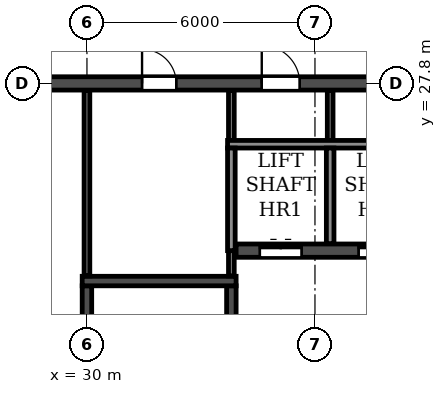
"""IFC4 building model, lengths in metres.
Left out: names, types, materials, properties, quantities, classifications, styles, units other than length and angle.
Written with IfcOpenShell. Run it as: python <this file> out.ifc"""

import sys

from ifc_helpers import new_model, si_unit, direction, frame, frame_2d, origin, place, context, subcontext, project, spatial, rectangle, extrude, element, fill, save


model = new_model("IFC4")
c1 = context("Model", 3, precision=1e-05, world=origin(), true_north=direction((0.0, 1.0)))
c2 = subcontext(c1, "Body", "Model", "MODEL_VIEW")
j1 = project(units=[si_unit("LENGTHUNIT", "METRE"), si_unit("PLANEANGLEUNIT", "RADIAN")], contexts=[c1])
p1 = place(None, origin())
s1 = spatial("IfcSite", under=j1, at=p1, CompositionType="ELEMENT")
p2 = place(p1, origin())
s2 = spatial("IfcBuilding", under=s1, at=p2, CompositionType="ELEMENT")
p3 = place(p2, frame((0.0, 0.0, 231.3)))
s3 = spatial("IfcBuildingStorey", under=s2, at=p3, CompositionType="ELEMENT", Elevation=231.3)
p4 = place(p3, frame((18.2, 27.8, 0.0), z_axis=(0.0, 0.0, 1.0), x_axis=(1.0, 0.0, 0.0)))
e1 = element("IfcWall", 1, at=p4, inside=s3, PredefinedType="SOLIDWALL", context=c2, shape_type="SweptSolid", body=[
    extrude(rectangle(XDim=65.6, YDim=0.35, at=frame_2d((32.8, 0.0))), origin(), (0.0, 0.0, 1.0), 3.08),
])
p5 = place(p4, frame((0.7, 0.0, 0.0)))
e2 = element("IfcOpeningElement", 2, at=p5, cuts=e1, PredefinedType="OPENING", context=c2, shape_type="SweptSolid", body=[
    extrude(rectangle(XDim=1.0, YDim=2.1, at=frame_2d((0.5, 1.05))), frame((0.0, 0.185, 0.0), z_axis=(0.0, -1.0, 0.0), x_axis=(1.0, 0.0, 0.0)), (0.0, 0.0, 1.0), 0.37),
])
p6 = place(p4, frame((4.05, 0.0, 0.0)))
e3 = element("IfcOpeningElement", 3, at=p6, cuts=e1, PredefinedType="OPENING", context=c2, shape_type="SweptSolid", body=[
    extrude(rectangle(XDim=0.9, YDim=2.1, at=frame_2d((0.45, 1.05))), frame((0.0, 0.185, 0.0), z_axis=(0.0, -1.0, 0.0), x_axis=(1.0, 0.0, 0.0)), (0.0, 0.0, 1.0), 0.37),
])
p7 = place(p4, frame((13.25, 0.0, 0.0)))
e4 = element("IfcOpeningElement", 4, at=p7, cuts=e1, PredefinedType="OPENING", context=c2, shape_type="SweptSolid", body=[
    extrude(rectangle(XDim=0.9, YDim=2.1, at=frame_2d((0.45, 1.05))), frame((0.0, 0.185, 0.0), z_axis=(0.0, -1.0, 0.0), x_axis=(1.0, 0.0, 0.0)), (0.0, 0.0, 1.0), 0.37),
])
p8 = place(p4, frame((16.4, 0.0, 0.0)))
e5 = element("IfcOpeningElement", 5, at=p8, cuts=e1, PredefinedType="OPENING", context=c2, shape_type="SweptSolid", body=[
    extrude(rectangle(XDim=1.0, YDim=2.1, at=frame_2d((0.5, 1.05))), frame((0.0, 0.185, 0.0), z_axis=(0.0, -1.0, 0.0), x_axis=(1.0, 0.0, 0.0)), (0.0, 0.0, 1.0), 0.37),
])
p9 = place(p4, frame((21.6, 0.0, 0.0)))
e6 = element("IfcOpeningElement", 6, at=p9, cuts=e1, PredefinedType="OPENING", context=c2, shape_type="SweptSolid", body=[
    extrude(rectangle(XDim=1.0, YDim=2.1, at=frame_2d((0.5, 1.05))), frame((0.0, 0.185, 0.0), z_axis=(0.0, -1.0, 0.0), x_axis=(1.0, 0.0, 0.0)), (0.0, 0.0, 1.0), 0.37),
])
p10 = place(p4, frame((29.4, 0.0, 0.0)))
e7 = element("IfcOpeningElement", 7, at=p10, cuts=e1, PredefinedType="OPENING", context=c2, shape_type="SweptSolid", body=[
    extrude(rectangle(XDim=1.0, YDim=2.1, at=frame_2d((0.5, 1.05))), frame((0.0, 0.185, 0.0), z_axis=(0.0, -1.0, 0.0), x_axis=(1.0, 0.0, 0.0)), (0.0, 0.0, 1.0), 0.37),
])
p11 = place(p4, frame((32.3, 0.0, 0.0)))
e8 = element("IfcOpeningElement", 8, at=p11, cuts=e1, PredefinedType="OPENING", context=c2, shape_type="SweptSolid", body=[
    extrude(rectangle(XDim=1.0, YDim=2.1, at=frame_2d((0.5, 1.05))), frame((0.0, 0.185, 0.0), z_axis=(0.0, -1.0, 0.0), x_axis=(1.0, 0.0, 0.0)), (0.0, 0.0, 1.0), 0.37),
])
p12 = place(p4, frame((35.2, 0.0, 0.0)))
e9 = element("IfcOpeningElement", 9, at=p12, cuts=e1, PredefinedType="OPENING", context=c2, shape_type="SweptSolid", body=[
    extrude(rectangle(XDim=1.0, YDim=2.1, at=frame_2d((0.5, 1.05))), frame((0.0, 0.185, 0.0), z_axis=(0.0, -1.0, 0.0), x_axis=(1.0, 0.0, 0.0)), (0.0, 0.0, 1.0), 0.37),
])
p13 = place(p4, frame((37.8, 0.0, 0.0)))
e10 = element("IfcOpeningElement", 10, at=p13, cuts=e1, PredefinedType="OPENING", context=c2, shape_type="SweptSolid", body=[
    extrude(rectangle(XDim=1.0, YDim=2.1, at=frame_2d((0.5, 1.05))), frame((0.0, 0.185, 0.0), z_axis=(0.0, -1.0, 0.0), x_axis=(1.0, 0.0, 0.0)), (0.0, 0.0, 1.0), 0.37),
])
p14 = place(p4, frame((40.4, 0.0, 0.0)))
e11 = element("IfcOpeningElement", 11, at=p14, cuts=e1, PredefinedType="OPENING", context=c2, shape_type="SweptSolid", body=[
    extrude(rectangle(XDim=1.0, YDim=2.1, at=frame_2d((0.5, 1.05))), frame((0.0, 0.185, 0.0), z_axis=(0.0, -1.0, 0.0), x_axis=(1.0, 0.0, 0.0)), (0.0, 0.0, 1.0), 0.37),
])
p15 = place(p4, frame((43.0, 0.0, 0.0)))
e12 = element("IfcOpeningElement", 12, at=p15, cuts=e1, PredefinedType="OPENING", context=c2, shape_type="SweptSolid", body=[
    extrude(rectangle(XDim=1.0, YDim=2.1, at=frame_2d((0.5, 1.05))), frame((0.0, 0.185, 0.0), z_axis=(0.0, -1.0, 0.0), x_axis=(1.0, 0.0, 0.0)), (0.0, 0.0, 1.0), 0.37),
])
p16 = place(p4, frame((45.6, 0.0, 0.0)))
e13 = element("IfcOpeningElement", 13, at=p16, cuts=e1, PredefinedType="OPENING", context=c2, shape_type="SweptSolid", body=[
    extrude(rectangle(XDim=1.0, YDim=2.1, at=frame_2d((0.5, 1.05))), frame((0.0, 0.185, 0.0), z_axis=(0.0, -1.0, 0.0), x_axis=(1.0, 0.0, 0.0)), (0.0, 0.0, 1.0), 0.37),
])
p17 = place(p4, frame((48.2, 0.0, 0.0)))
e14 = element("IfcOpeningElement", 14, at=p17, cuts=e1, PredefinedType="OPENING", context=c2, shape_type="SweptSolid", body=[
    extrude(rectangle(XDim=1.0, YDim=2.1, at=frame_2d((0.5, 1.05))), frame((0.0, 0.185, 0.0), z_axis=(0.0, -1.0, 0.0), x_axis=(1.0, 0.0, 0.0)), (0.0, 0.0, 1.0), 0.37),
])
p18 = place(p4, frame((51.45, 0.0, 0.0)))
e15 = element("IfcOpeningElement", 15, at=p18, cuts=e1, PredefinedType="OPENING", context=c2, shape_type="SweptSolid", body=[
    extrude(rectangle(XDim=0.9, YDim=2.1, at=frame_2d((0.45, 1.05))), frame((0.0, 0.185, 0.0), z_axis=(0.0, -1.0, 0.0), x_axis=(1.0, 0.0, 0.0)), (0.0, 0.0, 1.0), 0.37),
])
p19 = place(p4, frame((60.65, 0.0, 0.0)))
e16 = element("IfcOpeningElement", 16, at=p19, cuts=e1, PredefinedType="OPENING", context=c2, shape_type="SweptSolid", body=[
    extrude(rectangle(XDim=0.9, YDim=2.1, at=frame_2d((0.45, 1.05))), frame((0.0, 0.185, 0.0), z_axis=(0.0, -1.0, 0.0), x_axis=(1.0, 0.0, 0.0)), (0.0, 0.0, 1.0), 0.37),
])
p20 = place(p4, frame((63.9, 0.0, 0.0)))
e17 = element("IfcOpeningElement", 17, at=p20, cuts=e1, PredefinedType="OPENING", context=c2, shape_type="SweptSolid", body=[
    extrude(rectangle(XDim=1.0, YDim=2.1, at=frame_2d((0.5, 1.05))), frame((0.0, 0.185, 0.0), z_axis=(0.0, -1.0, 0.0), x_axis=(1.0, 0.0, 0.0)), (0.0, 0.0, 1.0), 0.37),
])
p21 = place(p3, frame((33.925, 23.4, 0.0), z_axis=(0.0, 0.0, 1.0), x_axis=(1.0, 0.0, 0.0)))
e18 = element("IfcWall", 18, at=p21, inside=s3, PredefinedType="SOLIDWALL", context=c2, shape_type="SweptSolid", body=[
    extrude(rectangle(XDim=34.15, YDim=0.35, at=frame_2d((17.075, 0.0))), origin(), (0.0, 0.0, 1.0), 3.08),
])
p22 = place(p21, frame((16.175, 0.0, 0.0)))
e19 = element("IfcOpeningElement", 19, at=p22, cuts=e18, PredefinedType="OPENING", context=c2, shape_type="SweptSolid", body=[
    extrude(rectangle(XDim=1.8, YDim=2.1, at=frame_2d((0.9, 1.05))), frame((0.0, 0.185, 0.0), z_axis=(0.0, -1.0, 0.0), x_axis=(1.0, 0.0, 0.0)), (0.0, 0.0, 1.0), 0.37),
])
p23 = place(p21, frame((0.625, 0.0, 0.0)))
e20 = element("IfcOpeningElement", 20, at=p23, cuts=e18, PredefinedType="OPENING", context=c2, shape_type="SweptSolid", body=[
    extrude(rectangle(XDim=1.1, YDim=2.1, at=frame_2d((0.55, 1.05))), frame((0.0, 0.185, 0.0), z_axis=(0.0, -1.0, 0.0), x_axis=(1.0, 0.0, 0.0)), (0.0, 0.0, 1.0), 0.37),
])
p24 = place(p21, frame((3.225, 0.0, 0.0)))
e21 = element("IfcOpeningElement", 21, at=p24, cuts=e18, PredefinedType="OPENING", context=c2, shape_type="SweptSolid", body=[
    extrude(rectangle(XDim=1.1, YDim=2.1, at=frame_2d((0.55, 1.05))), frame((0.0, 0.185, 0.0), z_axis=(0.0, -1.0, 0.0), x_axis=(1.0, 0.0, 0.0)), (0.0, 0.0, 1.0), 0.37),
])
p25 = place(p21, frame((5.825, 0.0, 0.0)))
e22 = element("IfcOpeningElement", 22, at=p25, cuts=e18, PredefinedType="OPENING", context=c2, shape_type="SweptSolid", body=[
    extrude(rectangle(XDim=1.1, YDim=2.1, at=frame_2d((0.55, 1.05))), frame((0.0, 0.185, 0.0), z_axis=(0.0, -1.0, 0.0), x_axis=(1.0, 0.0, 0.0)), (0.0, 0.0, 1.0), 0.37),
])
p26 = place(p21, frame((8.425, 0.0, 0.0)))
e23 = element("IfcOpeningElement", 23, at=p26, cuts=e18, PredefinedType="OPENING", context=c2, shape_type="SweptSolid", body=[
    extrude(rectangle(XDim=1.1, YDim=2.1, at=frame_2d((0.55, 1.05))), frame((0.0, 0.185, 0.0), z_axis=(0.0, -1.0, 0.0), x_axis=(1.0, 0.0, 0.0)), (0.0, 0.0, 1.0), 0.37),
])
p27 = place(p21, frame((11.025, 0.0, 0.0)))
e24 = element("IfcOpeningElement", 24, at=p27, cuts=e18, PredefinedType="OPENING", context=c2, shape_type="SweptSolid", body=[
    extrude(rectangle(XDim=1.1, YDim=2.1, at=frame_2d((0.55, 1.05))), frame((0.0, 0.185, 0.0), z_axis=(0.0, -1.0, 0.0), x_axis=(1.0, 0.0, 0.0)), (0.0, 0.0, 1.0), 0.37),
])
p28 = place(p21, frame((13.625, 0.0, 0.0)))
e25 = element("IfcOpeningElement", 25, at=p28, cuts=e18, PredefinedType="OPENING", context=c2, shape_type="SweptSolid", body=[
    extrude(rectangle(XDim=1.1, YDim=2.1, at=frame_2d((0.55, 1.05))), frame((0.0, 0.185, 0.0), z_axis=(0.0, -1.0, 0.0), x_axis=(1.0, 0.0, 0.0)), (0.0, 0.0, 1.0), 0.37),
])
p29 = place(p21, frame((27.225, 0.0, 0.0)))
e26 = element("IfcOpeningElement", 26, at=p29, cuts=e18, PredefinedType="OPENING", context=c2, shape_type="SweptSolid", body=[
    extrude(rectangle(XDim=1.1, YDim=2.1, at=frame_2d((0.55, 1.05))), frame((0.0, 0.185, 0.0), z_axis=(0.0, -1.0, 0.0), x_axis=(1.0, 0.0, 0.0)), (0.0, 0.0, 1.0), 0.37),
])
p30 = place(p3, frame((30.0, 14.775, 0.0), z_axis=(0.0, 0.0, 1.0), x_axis=(0.0, 1.0, 0.0)))
e27 = element("IfcWall", 27, at=p30, inside=s3, PredefinedType="SOLIDWALL", context=c2, shape_type="SweptSolid", body=[
    extrude(rectangle(XDim=7.7, YDim=0.25, at=frame_2d((3.85, 0.0))), origin(), (0.0, 0.0, 1.0), 3.08),
])
p31 = place(p3, frame((33.8, 14.775, 0.0), z_axis=(0.0, 0.0, 1.0), x_axis=(0.0, 1.0, 0.0)))
e28 = element("IfcWall", 28, at=p31, inside=s3, PredefinedType="SOLIDWALL", context=c2, shape_type="SweptSolid", body=[
    extrude(rectangle(XDim=7.7, YDim=0.25, at=frame_2d((3.85, 0.0))), origin(), (0.0, 0.0, 1.0), 3.08),
])
p32 = place(p31, frame((0.525, 0.0, 0.0)))
e29 = element("IfcOpeningElement", 29, at=p32, cuts=e28, PredefinedType="OPENING", context=c2, shape_type="SweptSolid", body=[
    extrude(rectangle(XDim=1.0, YDim=2.1, at=frame_2d((0.5, 1.05))), frame((0.0, 0.135, 0.0), z_axis=(0.0, -1.0, 0.0), x_axis=(1.0, 0.0, 0.0)), (0.0, 0.0, 1.0), 0.27),
])
p33 = place(p3, frame((29.875, 22.6, 0.0), z_axis=(0.0, 0.0, 1.0), x_axis=(1.0, 0.0, 0.0)))
e30 = element("IfcWall", 30, at=p33, inside=s3, PredefinedType="SOLIDWALL", context=c2, shape_type="SweptSolid", body=[
    extrude(rectangle(XDim=4.05, YDim=0.25, at=frame_2d((2.025, 0.0))), origin(), (0.0, 0.0, 1.0), 3.08),
])
p34 = place(p3, frame((36.4, 26.3, 0.0), z_axis=(0.0, 0.0, 1.0), x_axis=(0.0, 1.0, 0.0)))
e31 = element("IfcWall", 31, at=p34, inside=s3, PredefinedType="PARTITIONING", context=c2, shape_type="SweptSolid", body=[
    extrude(rectangle(XDim=1.315, YDim=0.15, at=frame_2d((0.657, 0.0))), origin(), (0.0, 0.0, 1.0), 3.08),
])
p35 = place(p3, frame((30.0, 22.735, 0.0), z_axis=(0.0, 0.0, 1.0), x_axis=(0.0, 1.0, 0.0)))
e32 = element("IfcWall", 32, at=p35, inside=s3, PredefinedType="PARTITIONING", context=c2, shape_type="SweptSolid", body=[
    extrude(rectangle(XDim=4.88, YDim=0.15, at=frame_2d((2.44, 0.0))), origin(), (0.0, 0.0, 1.0), 3.08),
])
p36 = place(p3, frame((33.8, 22.735, 0.0), z_axis=(0.0, 0.0, 1.0), x_axis=(0.0, 1.0, 0.0)))
e33 = element("IfcWall", 33, at=p36, inside=s3, PredefinedType="PARTITIONING", context=c2, shape_type="SweptSolid", body=[
    extrude(rectangle(XDim=0.665, YDim=0.15, at=frame_2d((0.333, 0.0))), origin(), (0.0, 0.0, 1.0), 3.08),
])
p37 = place(p3, frame((33.8, 26.3, 0.0), z_axis=(0.0, 0.0, 1.0), x_axis=(0.0, 1.0, 0.0)))
e34 = element("IfcWall", 34, at=p37, inside=s3, PredefinedType="PARTITIONING", context=c2, shape_type="SweptSolid", body=[
    extrude(rectangle(XDim=1.315, YDim=0.15, at=frame_2d((0.657, 0.0))), origin(), (0.0, 0.0, 1.0), 3.08),
])
p38 = place(p3, frame((33.7, 26.2, 0.0), z_axis=(0.0, 0.0, 1.0), x_axis=(1.0, 0.0, 0.0)))
e35 = element("IfcWall", 35, at=p38, inside=s3, PredefinedType="PARTITIONING", context=c2, shape_type="SweptSolid", body=[
    extrude(rectangle(XDim=10.4, YDim=0.2, at=frame_2d((5.2, 0.0))), origin(), (0.0, 0.0, 1.0), 3.08),
])
p39 = place(p3, frame((33.8, 23.4, 0.0), z_axis=(0.0, 0.0, 1.0), x_axis=(0.0, 1.0, 0.0)))
e36 = element("IfcWall", 36, at=p39, inside=s3, PredefinedType="PARTITIONING", context=c2, shape_type="SweptSolid", body=[
    extrude(rectangle(XDim=2.7, YDim=0.2, at=frame_2d((1.35, 0.0))), origin(), (0.0, 0.0, 1.0), 3.08),
])
p40 = place(p3, frame((36.4, 23.585, 0.0), z_axis=(0.0, 0.0, 1.0), x_axis=(0.0, 1.0, 0.0)))
e37 = element("IfcWall", 37, at=p40, inside=s3, PredefinedType="PARTITIONING", context=c2, shape_type="SweptSolid", body=[
    extrude(rectangle(XDim=2.515, YDim=0.2, at=frame_2d((1.258, 0.0))), origin(), (0.0, 0.0, 1.0), 3.08),
])
p41 = place(p7, origin())
e38 = element("IfcDoor", 38, at=p41, inside=s3, OperationType="SINGLE_SWING_LEFT", PredefinedType="DOOR", context=c2, shape_type="SweptSolid", body=[
    extrude(rectangle(XDim=0.9, YDim=2.1, at=frame_2d((0.45, 1.05))), frame((0.0, 0.025, 0.0), z_axis=(0.0, -1.0, 0.0), x_axis=(1.0, 0.0, 0.0)), (0.0, 0.0, 1.0), 0.05),
])
fill(e4, e38)
p42 = place(p8, origin())
e39 = element("IfcDoor", 39, at=p42, inside=s3, OperationType="SINGLE_SWING_LEFT", PredefinedType="DOOR", context=c2, shape_type="SweptSolid", body=[
    extrude(rectangle(XDim=1.0, YDim=2.1, at=frame_2d((0.5, 1.05))), frame((0.0, 0.025, 0.0), z_axis=(0.0, -1.0, 0.0), x_axis=(1.0, 0.0, 0.0)), (0.0, 0.0, 1.0), 0.05),
])
fill(e5, e39)
p43 = place(p23, origin())
e40 = element("IfcDoor", 40, at=p43, inside=s3, OperationType="DOUBLE_DOOR_SLIDING", PredefinedType="DOOR", context=c2, shape_type="SweptSolid", body=[
    extrude(rectangle(XDim=1.1, YDim=2.1, at=frame_2d((0.55, 1.05))), frame((0.0, 0.025, 0.0), z_axis=(0.0, -1.0, 0.0), x_axis=(1.0, 0.0, 0.0)), (0.0, 0.0, 1.0), 0.05),
])
fill(e20, e40)
p44 = place(p24, origin())
e41 = element("IfcDoor", 41, at=p44, inside=s3, OperationType="DOUBLE_DOOR_SLIDING", PredefinedType="DOOR", context=c2, shape_type="SweptSolid", body=[
    extrude(rectangle(XDim=1.1, YDim=2.1, at=frame_2d((0.55, 1.05))), frame((0.0, 0.025, 0.0), z_axis=(0.0, -1.0, 0.0), x_axis=(1.0, 0.0, 0.0)), (0.0, 0.0, 1.0), 0.05),
])
fill(e21, e41)
save(model, sys.argv[1])
